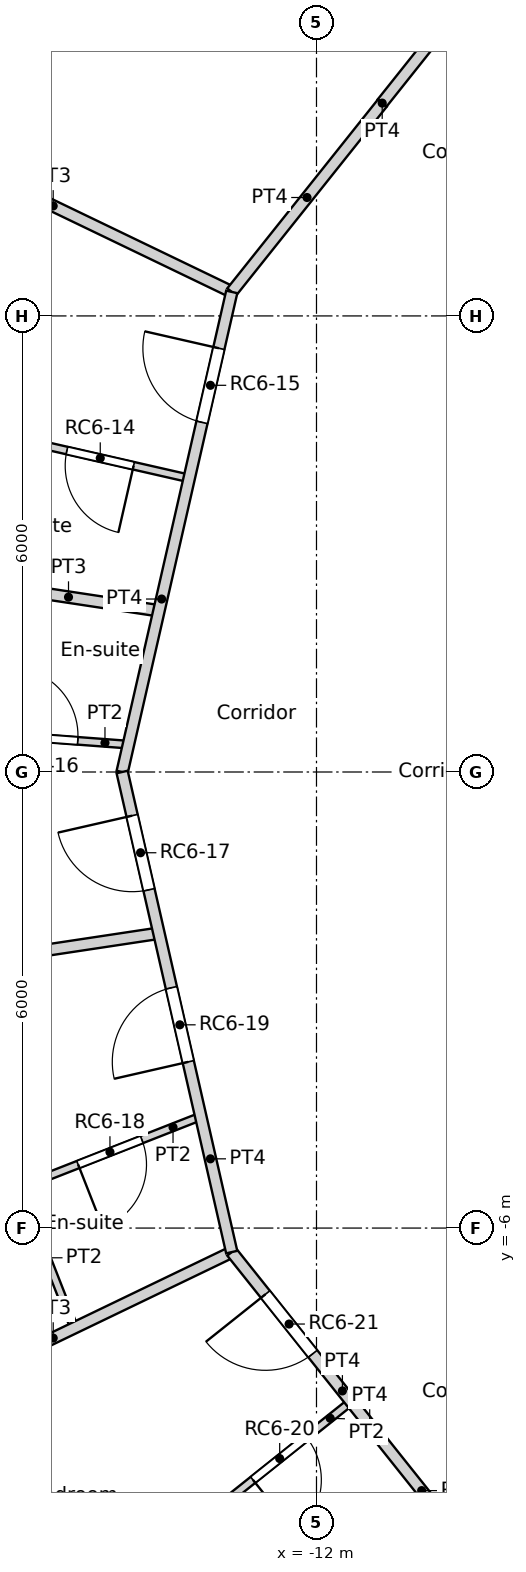
"""IFC4 building model, lengths in metres.
Left out: names, types, materials, properties, quantities, classifications, styles, units other than length and angle.
Written with IfcOpenShell. Run it as: python <this file> out.ifc"""

import sys

from ifc_helpers import new_model, si_unit, direction, frame, frame_2d, origin, place, context, subcontext, project, spatial, rectangle, extrude, element, fill, save


model = new_model("IFC4")
c1 = context("Model", 3, precision=1e-05, world=origin(), true_north=direction((0.0, 1.0)))
c2 = subcontext(c1, "Body", "Model", "MODEL_VIEW")
j1 = project(units=[si_unit("LENGTHUNIT", "METRE"), si_unit("PLANEANGLEUNIT", "RADIAN")], contexts=[c1])
p1 = place(None, origin())
s1 = spatial("IfcSite", under=j1, at=p1, CompositionType="ELEMENT")
p2 = place(p1, origin())
s2 = spatial("IfcBuilding", under=s1, at=p2, CompositionType="ELEMENT")
p3 = place(p2, frame((0.0, 0.0, 283.8)))
s3 = spatial("IfcBuildingStorey", under=s2, at=p3, CompositionType="ELEMENT", Elevation=283.8)
p4 = place(p3, frame((-11.134, 8.8, 0.0), z_axis=(0.0, 0.0, 1.0), x_axis=(-1.0, 0.0, 0.0)))
e1 = element("IfcWall", 1, at=p4, inside=s3, PredefinedType="PARTITIONING", context=c2, shape_type="SweptSolid", body=[
    extrude(rectangle(XDim=0.003, YDim=0.15, at=frame_2d((0.001, 0.0))), origin(), (0.0, 0.0, 1.0), 3.25),
])
p5 = place(p3, frame((-11.136, 8.802, 0.0), z_axis=(0.0, 0.0, 1.0), x_axis=(0.623151397235, 0.782101231379, 0.0)))
e2 = element("IfcWall", 2, at=p5, inside=s3, PredefinedType="PARTITIONING", context=c2, shape_type="SweptSolid", body=[
    extrude(rectangle(XDim=3.301, YDim=0.15, at=frame_2d((1.65, 0.0))), origin(), (0.0, 0.0, 1.0), 3.25),
])
p6 = place(p3, frame((-11.3, -8.596, 0.0), z_axis=(0.0, 0.0, 1.0), x_axis=(0.623390921228, -0.781910326911, 0.0)))
e3 = element("IfcWall", 3, at=p6, inside=s3, PredefinedType="PARTITIONING", context=c2, shape_type="SweptSolid", body=[
    extrude(rectangle(XDim=3.564, YDim=0.15, at=frame_2d((1.782, 0.0))), origin(), (0.0, 0.0, 1.0), 3.25),
])
p7 = place(p6, frame((2.244, 0.0, 0.0)))
e4 = element("IfcOpeningElement", 4, at=p7, cuts=e3, PredefinedType="OPENING", context=c2, shape_type="SweptSolid", body=[
    extrude(rectangle(XDim=1.0, YDim=2.1, at=frame_2d((0.5, 1.05))), frame((0.0, 0.075, 0.0), z_axis=(0.0, -1.0, 0.0), x_axis=(1.0, 0.0, 0.0)), (0.0, 0.0, 1.0), 0.15),
])
p8 = place(p3, frame((-11.3, -8.596, 0.0), z_axis=(0.0, 0.0, 1.0), x_axis=(0.0, 1.0, 0.0)))
e5 = element("IfcWall", 5, at=p8, inside=s3, PredefinedType="PARTITIONING", context=c2, shape_type="SweptSolid", body=[
    extrude(rectangle(XDim=0.009, YDim=0.15, at=frame_2d((0.005, 0.0))), origin(), (0.0, 0.0, 1.0), 3.25),
])
p9 = place(p3, frame((-13.115, 6.316, 0.0), z_axis=(0.0, 0.0, 1.0), x_axis=(0.623476099415, 0.781842409606, 0.0)))
e6 = element("IfcWall", 6, at=p9, inside=s3, PredefinedType="PARTITIONING", context=c2, shape_type="SweptSolid", body=[
    extrude(rectangle(XDim=3.177, YDim=0.15, at=frame_2d((1.589, 0.0))), origin(), (0.0, 0.0, 1.0), 3.25),
])
p10 = place(p3, frame((-14.557, 0.0, 0.0), z_axis=(0.0, 0.0, 1.0), x_axis=(0.222533159771, 0.974925121639, 0.0)))
e7 = element("IfcWall", 7, at=p10, inside=s3, PredefinedType="PARTITIONING", context=c2, shape_type="SweptSolid", body=[
    extrude(rectangle(XDim=6.478, YDim=0.15, at=frame_2d((3.239, 0.0))), origin(), (0.0, 0.0, 1.0), 3.25),
])
p11 = place(p10, frame((4.718, 0.0, 0.0)))
e8 = element("IfcOpeningElement", 8, at=p11, cuts=e7, PredefinedType="OPENING", context=c2, shape_type="SweptSolid", body=[
    extrude(rectangle(XDim=1.0, YDim=2.1, at=frame_2d((0.5, 1.05))), frame((0.0, 0.075, 0.0), z_axis=(0.0, -1.0, 0.0), x_axis=(1.0, 0.0, 0.0)), (0.0, 0.0, 1.0), 0.15),
])
p12 = place(p3, frame((-14.557, 0.0, 0.0), z_axis=(0.0, 0.0, 1.0), x_axis=(0.222489165471, -0.974935162587, 0.0)))
e9 = element("IfcWall", 9, at=p12, inside=s3, PredefinedType="PARTITIONING", context=c2, shape_type="SweptSolid", body=[
    extrude(rectangle(XDim=6.479, YDim=0.15, at=frame_2d((3.239, 0.0))), origin(), (0.0, 0.0, 1.0), 3.25),
])
p13 = place(p12, frame((0.59, 0.0, 0.0)))
e10 = element("IfcOpeningElement", 10, at=p13, cuts=e9, PredefinedType="OPENING", context=c2, shape_type="SweptSolid", body=[
    extrude(rectangle(XDim=1.0, YDim=2.1, at=frame_2d((0.5, 1.05))), frame((0.0, 0.075, 0.0), z_axis=(0.0, -1.0, 0.0), x_axis=(1.0, 0.0, 0.0)), (0.0, 0.0, 1.0), 0.15),
])
p14 = place(p12, frame((2.912, 0.0, 0.0)))
e11 = element("IfcOpeningElement", 11, at=p14, cuts=e9, PredefinedType="OPENING", context=c2, shape_type="SweptSolid", body=[
    extrude(rectangle(XDim=1.0, YDim=2.1, at=frame_2d((0.5, 1.05))), frame((0.0, 0.075, 0.0), z_axis=(0.0, -1.0, 0.0), x_axis=(1.0, 0.0, 0.0)), (0.0, 0.0, 1.0), 0.15),
])
p15 = place(p3, frame((-13.115, -6.316, 0.0), z_axis=(0.0, 0.0, 1.0), x_axis=(0.623303083673, -0.781980348784, 0.0)))
e12 = element("IfcWall", 12, at=p15, inside=s3, PredefinedType="PARTITIONING", context=c2, shape_type="SweptSolid", body=[
    extrude(rectangle(XDim=2.911, YDim=0.15, at=frame_2d((1.456, 0.0))), origin(), (0.0, 0.0, 1.0), 3.25),
])
p16 = place(p15, frame((0.71, 0.0, 0.0)))
e13 = element("IfcOpeningElement", 13, at=p16, cuts=e12, PredefinedType="OPENING", context=c2, shape_type="SweptSolid", body=[
    extrude(rectangle(XDim=1.0, YDim=2.1, at=frame_2d((0.5, 1.05))), frame((0.0, 0.075, 0.0), z_axis=(0.0, -1.0, 0.0), x_axis=(1.0, 0.0, 0.0)), (0.0, 0.0, 1.0), 0.15),
])
p17 = place(p3, frame((-17.813, 8.578, 0.0), z_axis=(0.0, 0.0, 1.0), x_axis=(0.901004381064, -0.433809987557, 0.0)))
e14 = element("IfcWall", 14, at=p17, inside=s3, PredefinedType="PARTITIONING", context=c2, shape_type="SweptSolid", body=[
    extrude(rectangle(XDim=5.214, YDim=0.15, at=frame_2d((2.607, 0.0))), origin(), (0.0, 0.0, 1.0), 3.25),
])
p18 = place(p3, frame((-16.015, 4.396, 0.0), z_axis=(0.0, 0.0, 1.0), x_axis=(0.97493862442, -0.222473995368, 0.0)))
e15 = element("IfcWall", 15, at=p18, inside=s3, PredefinedType="PARTITIONING", context=c2, shape_type="SweptSolid", body=[
    extrude(rectangle(XDim=2.4, YDim=0.1, at=frame_2d((1.2, 0.0))), origin(), (0.0, 0.0, 1.0), 3.25),
])
p19 = place(p18, frame((0.75, 0.0, 0.0)))
e16 = element("IfcOpeningElement", 16, at=p19, cuts=e15, PredefinedType="OPENING", context=c2, shape_type="SweptSolid", body=[
    extrude(rectangle(XDim=0.9, YDim=2.04, at=frame_2d((0.45, 1.02))), frame((0.0, 0.05, 0.0), z_axis=(0.0, -1.0, 0.0), x_axis=(1.0, 0.0, 0.0)), (0.0, 0.0, 1.0), 0.1),
])
p20 = place(p3, frame((-16.452, 2.48, 0.0), z_axis=(0.0, 0.0, 1.0), x_axis=(0.988810951618, -0.149174065977, 0.0)))
e17 = element("IfcWall", 17, at=p20, inside=s3, PredefinedType="PARTITIONING", context=c2, shape_type="SweptSolid", body=[
    extrude(rectangle(XDim=2.406, YDim=0.15, at=frame_2d((1.203, 0.0))), origin(), (0.0, 0.0, 1.0), 3.25),
])
p21 = place(p3, frame((-16.703, 0.527, 0.0), z_axis=(0.0, 0.0, 1.0), x_axis=(0.997202365433, -0.074749196488, 0.0)))
e18 = element("IfcWall", 18, at=p21, inside=s3, PredefinedType="PARTITIONING", context=c2, shape_type="SweptSolid", body=[
    extrude(rectangle(XDim=2.234, YDim=0.1, at=frame_2d((1.117, 0.0))), origin(), (0.0, 0.0, 1.0), 3.25),
])
p22 = place(p21, frame((0.667, 0.0, 0.0)))
e19 = element("IfcOpeningElement", 19, at=p22, cuts=e18, PredefinedType="OPENING", context=c2, shape_type="SweptSolid", body=[
    extrude(rectangle(XDim=0.9, YDim=2.04, at=frame_2d((0.45, 1.02))), frame((0.0, 0.05, 0.0), z_axis=(0.0, -1.0, 0.0), x_axis=(1.0, 0.0, 0.0)), (0.0, 0.0, 1.0), 0.1),
])
p23 = place(p3, frame((-19.551, -2.947, 0.0), z_axis=(0.0, 0.0, 1.0), x_axis=(0.988824228734, 0.149086031099, 0.0)))
e20 = element("IfcWall", 20, at=p23, inside=s3, PredefinedType="PARTITIONING", context=c2, shape_type="SweptSolid", body=[
    extrude(rectangle(XDim=5.54, YDim=0.15, at=frame_2d((2.77, 0.0))), origin(), (0.0, 0.0, 1.0), 3.25),
])
p24 = place(p3, frame((-15.911, -5.468, 0.0), z_axis=(0.0, 0.0, 1.0), x_axis=(0.930898333543, 0.365278376867, 0.0)))
e21 = element("IfcWall", 21, at=p24, inside=s3, PredefinedType="PARTITIONING", context=c2, shape_type="SweptSolid", body=[
    extrude(rectangle(XDim=2.565, YDim=0.1, at=frame_2d((1.283, 0.0))), origin(), (0.0, 0.0, 1.0), 3.25),
])
p25 = place(p24, frame((0.832, 0.0, 0.0)))
e22 = element("IfcOpeningElement", 22, at=p25, cuts=e21, PredefinedType="OPENING", context=c2, shape_type="SweptSolid", body=[
    extrude(rectangle(XDim=0.9, YDim=2.04, at=frame_2d((0.45, 1.02))), frame((0.0, 0.05, 0.0), z_axis=(0.0, -1.0, 0.0), x_axis=(1.0, 0.0, 0.0)), (0.0, 0.0, 1.0), 0.1),
])
p26 = place(p3, frame((-15.911, -5.468, 0.0), z_axis=(0.0, 0.0, 1.0), x_axis=(0.36507706633, -0.930977301356, 0.0)))
e23 = element("IfcWall", 23, at=p26, inside=s3, PredefinedType="PARTITIONING", context=c2, shape_type="SweptSolid", body=[
    extrude(rectangle(XDim=1.983, YDim=0.1, at=frame_2d((0.991, 0.0))), origin(), (0.0, 0.0, 1.0), 3.25),
])
p27 = place(p3, frame((-17.813, -8.578, 0.0), z_axis=(0.0, 0.0, 1.0), x_axis=(0.901049790108, 0.433715662325, 0.0)))
e24 = element("IfcWall", 24, at=p27, inside=s3, PredefinedType="PARTITIONING", context=c2, shape_type="SweptSolid", body=[
    extrude(rectangle(XDim=5.214, YDim=0.15, at=frame_2d((2.607, 0.0))), origin(), (0.0, 0.0, 1.0), 3.25),
])
p28 = place(p3, frame((-13.422, -9.78, 0.0), z_axis=(0.0, 0.0, 1.0), x_axis=(0.781860394524, 0.623453545562, 0.0)))
e25 = element("IfcWall", 25, at=p28, inside=s3, PredefinedType="PARTITIONING", context=c2, shape_type="SweptSolid", body=[
    extrude(rectangle(XDim=2.4, YDim=0.1, at=frame_2d((1.2, 0.0))), origin(), (0.0, 0.0, 1.0), 3.25),
])
p29 = place(p28, frame((0.75, 0.0, 0.0)))
e26 = element("IfcOpeningElement", 26, at=p29, cuts=e25, PredefinedType="OPENING", context=c2, shape_type="SweptSolid", body=[
    extrude(rectangle(XDim=0.9, YDim=2.04, at=frame_2d((0.45, 1.02))), frame((0.0, 0.05, 0.0), z_axis=(0.0, -1.0, 0.0), x_axis=(1.0, 0.0, 0.0)), (0.0, 0.0, 1.0), 0.1),
])
p30 = place(p19, origin())
e27 = element("IfcDoor", 27, at=p30, inside=s3, OperationType="SINGLE_SWING_LEFT", PredefinedType="DOOR", context=c2, shape_type="SweptSolid", body=[
    extrude(rectangle(XDim=0.9, YDim=2.04, at=frame_2d((0.45, 1.02))), frame((0.0, 0.025, 0.0), z_axis=(0.0, -1.0, 0.0), x_axis=(1.0, 0.0, 0.0)), (0.0, 0.0, 1.0), 0.05),
])
fill(e16, e27)
p31 = place(p11, origin())
e28 = element("IfcDoor", 28, at=p31, inside=s3, OperationType="SINGLE_SWING_RIGHT", PredefinedType="DOOR", context=c2, shape_type="SweptSolid", body=[
    extrude(rectangle(XDim=1.0, YDim=2.1, at=frame_2d((0.5, 1.05))), frame((0.0, 0.025, 0.0), z_axis=(0.0, -1.0, 0.0), x_axis=(1.0, 0.0, 0.0)), (0.0, 0.0, 1.0), 0.05),
])
fill(e8, e28)
p32 = place(p22, origin())
e29 = element("IfcDoor", 29, at=p32, inside=s3, OperationType="SINGLE_SWING_LEFT", PredefinedType="DOOR", context=c2, shape_type="SweptSolid", body=[
    extrude(rectangle(XDim=0.9, YDim=2.04, at=frame_2d((0.45, 1.02))), frame((0.0, 0.025, 0.0), z_axis=(0.0, -1.0, 0.0), x_axis=(1.0, 0.0, 0.0)), (0.0, 0.0, 1.0), 0.05),
])
fill(e19, e29)
p33 = place(p13, origin())
e30 = element("IfcDoor", 30, at=p33, inside=s3, OperationType="SINGLE_SWING_RIGHT", PredefinedType="DOOR", context=c2, shape_type="SweptSolid", body=[
    extrude(rectangle(XDim=1.0, YDim=2.1, at=frame_2d((0.5, 1.05))), frame((0.0, 0.025, 0.0), z_axis=(0.0, -1.0, 0.0), x_axis=(1.0, 0.0, 0.0)), (0.0, 0.0, 1.0), 0.05),
])
fill(e10, e30)
p34 = place(p25, origin())
e31 = element("IfcDoor", 31, at=p34, inside=s3, OperationType="SINGLE_SWING_RIGHT", PredefinedType="DOOR", context=c2, shape_type="SweptSolid", body=[
    extrude(rectangle(XDim=0.9, YDim=2.04, at=frame_2d((0.45, 1.02))), frame((0.0, 0.025, 0.0), z_axis=(0.0, -1.0, 0.0), x_axis=(1.0, 0.0, 0.0)), (0.0, 0.0, 1.0), 0.05),
])
fill(e22, e31)
p35 = place(p14, origin())
e32 = element("IfcDoor", 32, at=p35, inside=s3, OperationType="SINGLE_SWING_LEFT", PredefinedType="DOOR", context=c2, shape_type="SweptSolid", body=[
    extrude(rectangle(XDim=1.0, YDim=2.1, at=frame_2d((0.5, 1.05))), frame((0.0, 0.025, 0.0), z_axis=(0.0, -1.0, 0.0), x_axis=(1.0, 0.0, 0.0)), (0.0, 0.0, 1.0), 0.05),
])
fill(e11, e32)
p36 = place(p29, origin())
e33 = element("IfcDoor", 33, at=p36, inside=s3, OperationType="SINGLE_SWING_RIGHT", PredefinedType="DOOR", context=c2, shape_type="SweptSolid", body=[
    extrude(rectangle(XDim=0.9, YDim=2.04, at=frame_2d((0.45, 1.02))), frame((0.0, 0.025, 0.0), z_axis=(0.0, -1.0, 0.0), x_axis=(1.0, 0.0, 0.0)), (0.0, 0.0, 1.0), 0.05),
])
fill(e26, e33)
p37 = place(p16, origin())
e34 = element("IfcDoor", 34, at=p37, inside=s3, OperationType="SINGLE_SWING_RIGHT", PredefinedType="DOOR", context=c2, shape_type="SweptSolid", body=[
    extrude(rectangle(XDim=1.0, YDim=2.1, at=frame_2d((0.5, 1.05))), frame((0.0, 0.025, 0.0), z_axis=(0.0, -1.0, 0.0), x_axis=(1.0, 0.0, 0.0)), (0.0, 0.0, 1.0), 0.05),
])
fill(e13, e34)
save(model, sys.argv[1])
